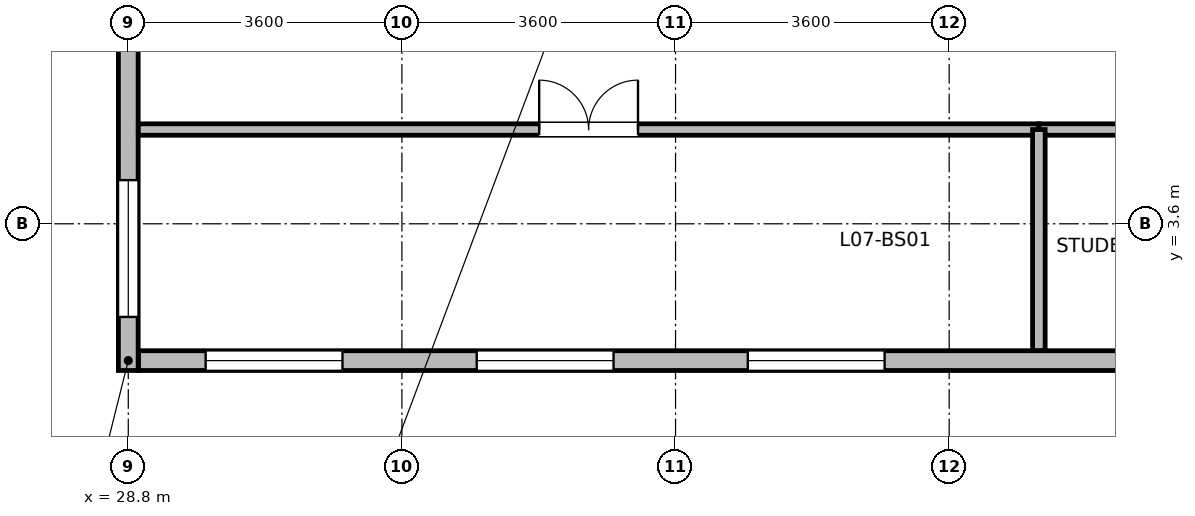
"""IFC4 building model, lengths in metres.
Left out: names, types, materials, properties, quantities, classifications, styles, units other than length and angle.
Written with IfcOpenShell. Run it as: python <this file> out.ifc"""

import sys

from ifc_helpers import new_model, si_unit, direction, frame, frame_2d, origin, place, context, subcontext, project, spatial, rectangle, extrude, element, fill, save


model = new_model("IFC4")
c1 = context("Model", 3, precision=1e-05, world=origin(), true_north=direction((0.0, 1.0)))
c2 = subcontext(c1, "Body", "Model", "MODEL_VIEW")
j1 = project(units=[si_unit("LENGTHUNIT", "METRE"), si_unit("PLANEANGLEUNIT", "RADIAN")], contexts=[c1])
p1 = place(None, origin())
s1 = spatial("IfcSite", under=j1, at=p1, CompositionType="ELEMENT")
p2 = place(p1, origin())
s2 = spatial("IfcBuilding", under=s1, at=p2, CompositionType="ELEMENT")
p3 = place(p2, frame((0.0, 0.0, 32.7)))
s3 = spatial("IfcBuildingStorey", under=s2, at=p3, CompositionType="ELEMENT", Elevation=32.7)
p4 = place(p3, frame((57.465, 1.8, 0.0), z_axis=(0.0, 0.0, 1.0), x_axis=(-1.0, 0.0, 0.0)))
e1 = element("IfcWall", 1, at=p4, inside=s3, PredefinedType="STANDARD", context=c2, shape_type="SweptSolid", body=[
    extrude(rectangle(XDim=28.53, YDim=0.26, at=frame_2d((14.265, 0.0))), origin(), (0.0, 0.0, 1.0), 3.43),
])
p5 = place(p4, frame((0.883, 0.0, 0.85)))
e2 = element("IfcOpeningElement", 2, at=p5, cuts=e1, PredefinedType="OPENING", context=c2, shape_type="SweptSolid", body=[
    extrude(rectangle(XDim=1.8, YDim=1.85, at=frame_2d((0.9, 0.925))), frame((0.0, 0.14, 0.0), z_axis=(0.0, -1.0, 0.0), x_axis=(1.0, 0.0, 0.0)), (0.0, 0.0, 1.0), 0.28),
])
p6 = place(p4, frame((4.449, 0.0, 0.85)))
e3 = element("IfcOpeningElement", 3, at=p6, cuts=e1, PredefinedType="OPENING", context=c2, shape_type="SweptSolid", body=[
    extrude(rectangle(XDim=1.8, YDim=1.85, at=frame_2d((0.9, 0.925))), frame((0.0, 0.14, 0.0), z_axis=(0.0, -1.0, 0.0), x_axis=(1.0, 0.0, 0.0)), (0.0, 0.0, 1.0), 0.28),
])
p7 = place(p4, frame((11.582, 0.0, 0.85)))
e4 = element("IfcOpeningElement", 4, at=p7, cuts=e1, PredefinedType="OPENING", context=c2, shape_type="SweptSolid", body=[
    extrude(rectangle(XDim=1.8, YDim=1.85, at=frame_2d((0.9, 0.925))), frame((0.0, 0.14, 0.0), z_axis=(0.0, -1.0, 0.0), x_axis=(1.0, 0.0, 0.0)), (0.0, 0.0, 1.0), 0.28),
])
p8 = place(p4, frame((18.714, 0.0, 0.85)))
e5 = element("IfcOpeningElement", 5, at=p8, cuts=e1, PredefinedType="OPENING", context=c2, shape_type="SweptSolid", body=[
    extrude(rectangle(XDim=1.8, YDim=1.85, at=frame_2d((0.9, 0.925))), frame((0.0, 0.14, 0.0), z_axis=(0.0, -1.0, 0.0), x_axis=(1.0, 0.0, 0.0)), (0.0, 0.0, 1.0), 0.28),
])
p9 = place(p4, frame((22.281, 0.0, 0.85)))
e6 = element("IfcOpeningElement", 6, at=p9, cuts=e1, PredefinedType="OPENING", context=c2, shape_type="SweptSolid", body=[
    extrude(rectangle(XDim=1.8, YDim=1.85, at=frame_2d((0.9, 0.925))), frame((0.0, 0.14, 0.0), z_axis=(0.0, -1.0, 0.0), x_axis=(1.0, 0.0, 0.0)), (0.0, 0.0, 1.0), 0.28),
])
p10 = place(p4, frame((25.847, 0.0, 0.85)))
e7 = element("IfcOpeningElement", 7, at=p10, cuts=e1, PredefinedType="OPENING", context=c2, shape_type="SweptSolid", body=[
    extrude(rectangle(XDim=1.8, YDim=1.85, at=frame_2d((0.9, 0.925))), frame((0.0, 0.14, 0.0), z_axis=(0.0, -1.0, 0.0), x_axis=(1.0, 0.0, 0.0)), (0.0, 0.0, 1.0), 0.28),
])
p11 = place(p3, frame((28.8, 1.67, 0.0), z_axis=(0.0, 0.0, 1.0), x_axis=(0.0, 1.0, 0.0)))
e8 = element("IfcWall", 8, at=p11, inside=s3, PredefinedType="STANDARD", context=c2, shape_type="SweptSolid", body=[
    extrude(rectangle(XDim=19.254, YDim=0.26, at=frame_2d((9.627, 0.0))), origin(), (0.0, 0.0, 1.0), 3.43),
])
p12 = place(p11, frame((0.705, 0.0, 0.85)))
e9 = element("IfcOpeningElement", 9, at=p12, cuts=e8, PredefinedType="OPENING", context=c2, shape_type="SweptSolid", body=[
    extrude(rectangle(XDim=1.8, YDim=1.85, at=frame_2d((0.9, 0.925))), frame((0.0, 0.14, 0.0), z_axis=(0.0, -1.0, 0.0), x_axis=(1.0, 0.0, 0.0)), (0.0, 0.0, 1.0), 0.28),
])
p13 = place(p11, frame((7.123, 0.0, 0.85)))
e10 = element("IfcOpeningElement", 10, at=p13, cuts=e8, PredefinedType="OPENING", context=c2, shape_type="SweptSolid", body=[
    extrude(rectangle(XDim=1.8, YDim=1.85, at=frame_2d((0.9, 0.925))), frame((0.0, 0.14, 0.0), z_axis=(0.0, -1.0, 0.0), x_axis=(1.0, 0.0, 0.0)), (0.0, 0.0, 1.0), 0.28),
])
p14 = place(p11, frame((10.332, 0.0, 0.85)))
e11 = element("IfcOpeningElement", 11, at=p14, cuts=e8, PredefinedType="OPENING", context=c2, shape_type="SweptSolid", body=[
    extrude(rectangle(XDim=1.8, YDim=1.85, at=frame_2d((0.9, 0.925))), frame((0.0, 0.14, 0.0), z_axis=(0.0, -1.0, 0.0), x_axis=(1.0, 0.0, 0.0)), (0.0, 0.0, 1.0), 0.28),
])
p15 = place(p11, frame((13.541, 0.0, 0.85)))
e12 = element("IfcOpeningElement", 12, at=p15, cuts=e8, PredefinedType="OPENING", context=c2, shape_type="SweptSolid", body=[
    extrude(rectangle(XDim=1.8, YDim=1.85, at=frame_2d((0.9, 0.925))), frame((0.0, 0.14, 0.0), z_axis=(0.0, -1.0, 0.0), x_axis=(1.0, 0.0, 0.0)), (0.0, 0.0, 1.0), 0.28),
])
p16 = place(p11, frame((16.75, 0.0, 0.85)))
e13 = element("IfcOpeningElement", 13, at=p16, cuts=e8, PredefinedType="OPENING", context=c2, shape_type="SweptSolid", body=[
    extrude(rectangle(XDim=1.8, YDim=1.85, at=frame_2d((0.9, 0.925))), frame((0.0, 0.14, 0.0), z_axis=(0.0, -1.0, 0.0), x_axis=(1.0, 0.0, 0.0)), (0.0, 0.0, 1.0), 0.28),
])
p17 = place(p3, frame((28.932, 4.84, 0.0), z_axis=(0.0, 0.0, 1.0), x_axis=(1.0, 0.0, 0.0)))
e14 = element("IfcWall", 14, at=p17, inside=s3, PredefinedType="PARTITIONING", context=c2, shape_type="SweptSolid", body=[
    extrude(rectangle(XDim=11.848, YDim=0.15, at=frame_2d((5.924, 0.0))), origin(), (0.0, 0.0, 1.0), 3.43),
])
p18 = place(p17, frame((5.274, 0.0, 0.0)))
e15 = element("IfcOpeningElement", 15, at=p18, cuts=e14, PredefinedType="OPENING", context=c2, shape_type="SweptSolid", body=[
    extrude(rectangle(XDim=1.3, YDim=2.12, at=frame_2d((0.65, 1.06))), frame((0.0, 0.085, 0.0), z_axis=(0.0, -1.0, 0.0), x_axis=(1.0, 0.0, 0.0)), (0.0, 0.0, 1.0), 0.17),
])
p19 = place(p3, frame((40.78, 4.84, 0.0), z_axis=(0.0, 0.0, 1.0), x_axis=(1.0, 0.0, 0.0)))
e16 = element("IfcWall", 16, at=p19, inside=s3, PredefinedType="PARTITIONING", context=c2, shape_type="SweptSolid", body=[
    extrude(rectangle(XDim=8.12, YDim=0.15, at=frame_2d((4.06, 0.0))), origin(), (0.0, 0.0, 1.0), 3.43),
])
p20 = place(p19, frame((3.585, 0.0, 0.0)))
e17 = element("IfcOpeningElement", 17, at=p20, cuts=e16, PredefinedType="OPENING", context=c2, shape_type="SweptSolid", body=[
    extrude(rectangle(XDim=0.95, YDim=2.1, at=frame_2d((0.475, 1.05))), frame((0.0, 0.085, 0.0), z_axis=(0.0, -1.0, 0.0), x_axis=(1.0, 0.0, 0.0)), (0.0, 0.0, 1.0), 0.17),
])
p21 = place(p3, frame((40.78, 1.932, 0.0), z_axis=(0.0, 0.0, 1.0), x_axis=(0.0, 1.0, 0.0)))
e18 = element("IfcWall", 18, at=p21, inside=s3, PredefinedType="PARTITIONING", context=c2, shape_type="SweptSolid", body=[
    extrude(rectangle(XDim=2.908, YDim=0.165, at=frame_2d((1.454, 0.0))), origin(), (0.0, 0.0, 1.0), 3.43),
])
p22 = place(p8, origin())
e19 = element("IfcWindow", 19, at=p22, inside=s3, PartitioningType="SINGLE_PANEL", PredefinedType="WINDOW", context=c2, shape_type="SweptSolid", body=[
    extrude(rectangle(XDim=1.8, YDim=1.85, at=frame_2d((0.9, 0.925))), frame((0.0, 0.03, 0.0), z_axis=(0.0, -1.0, 0.0), x_axis=(1.0, 0.0, 0.0)), (0.0, 0.0, 1.0), 0.06),
])
fill(e5, e19)
p23 = place(p9, origin())
e20 = element("IfcWindow", 20, at=p23, inside=s3, PartitioningType="SINGLE_PANEL", PredefinedType="WINDOW", context=c2, shape_type="SweptSolid", body=[
    extrude(rectangle(XDim=1.8, YDim=1.85, at=frame_2d((0.9, 0.925))), frame((0.0, 0.03, 0.0), z_axis=(0.0, -1.0, 0.0), x_axis=(1.0, 0.0, 0.0)), (0.0, 0.0, 1.0), 0.06),
])
fill(e6, e20)
p24 = place(p10, origin())
e21 = element("IfcWindow", 21, at=p24, inside=s3, PartitioningType="SINGLE_PANEL", PredefinedType="WINDOW", context=c2, shape_type="SweptSolid", body=[
    extrude(rectangle(XDim=1.8, YDim=1.85, at=frame_2d((0.9, 0.925))), frame((0.0, 0.03, 0.0), z_axis=(0.0, -1.0, 0.0), x_axis=(1.0, 0.0, 0.0)), (0.0, 0.0, 1.0), 0.06),
])
fill(e7, e21)
p25 = place(p12, origin())
e22 = element("IfcWindow", 22, at=p25, inside=s3, PartitioningType="SINGLE_PANEL", PredefinedType="WINDOW", context=c2, shape_type="SweptSolid", body=[
    extrude(rectangle(XDim=1.8, YDim=1.85, at=frame_2d((0.9, 0.925))), frame((0.0, 0.03, 0.0), z_axis=(0.0, -1.0, 0.0), x_axis=(1.0, 0.0, 0.0)), (0.0, 0.0, 1.0), 0.06),
])
fill(e9, e22)
p26 = place(p18, origin())
e23 = element("IfcDoor", 23, at=p26, inside=s3, OperationType="DOUBLE_DOOR_SINGLE_SWING", PredefinedType="DOOR", context=c2, shape_type="SweptSolid", body=[
    extrude(rectangle(XDim=1.3, YDim=2.12, at=frame_2d((0.65, 1.06))), frame((0.0, 0.025, 0.0), z_axis=(0.0, -1.0, 0.0), x_axis=(1.0, 0.0, 0.0)), (0.0, 0.0, 1.0), 0.05),
])
fill(e15, e23)
save(model, sys.argv[1])
